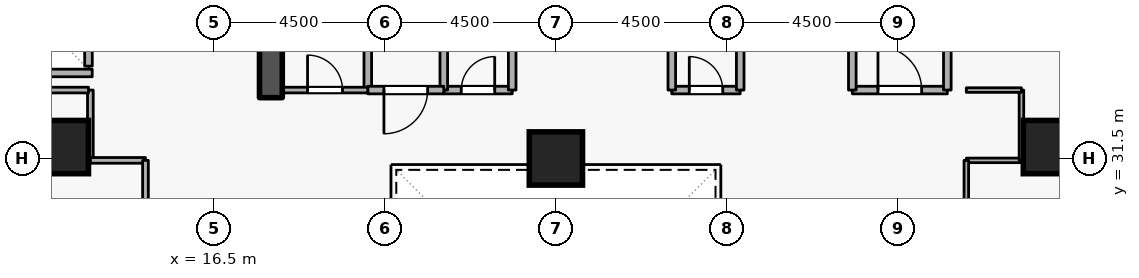
"""IFC4 building model, lengths in metres.
Left out: names, types, materials, properties, quantities, classifications, styles, units other than length and angle.
Written with IfcOpenShell. Run it as: python <this file> out.ifc"""

import sys

from ifc_helpers import new_model, si_unit, direction, frame, frame_2d, origin, origin_2d, place, context, subcontext, project, spatial, rectangle, extrude, element, fill, save


model = new_model("IFC4")
c1 = context("Model", 3, precision=1e-05, world=origin(), true_north=direction((0.0, 1.0)))
c2 = subcontext(c1, "Body", "Model", "MODEL_VIEW")
j1 = project(units=[si_unit("LENGTHUNIT", "METRE"), si_unit("PLANEANGLEUNIT", "RADIAN")], contexts=[c1])
p1 = place(None, origin())
s1 = spatial("IfcSite", under=j1, at=p1, CompositionType="ELEMENT")
p2 = place(p1, origin())
s2 = spatial("IfcBuilding", under=s1, at=p2, CompositionType="ELEMENT")
p3 = place(p2, frame((0.0, 0.0, 53.7)))
s3 = spatial("IfcBuildingStorey", under=s2, at=p3, CompositionType="ELEMENT", Elevation=53.7)
p4 = place(p3, frame((18.0, 33.1, 0.0), z_axis=(0.0, 0.0, 1.0), x_axis=(0.0, 1.0, 0.0)))
e1 = element("IfcWall", 1, at=p4, inside=s3, PredefinedType="SHEAR", context=c2, shape_type="SweptSolid", body=[
    extrude(rectangle(XDim=5.7, YDim=0.6, at=frame_2d((2.85, 0.0))), origin(), (0.0, 0.0, 1.0), 3.6),
])
for number, where, z_axis, x_axis in (
    (2, (12.5, 31.8, 0.0), (0.0, 0.0, 1.0), (1.0, 0.0, 0.0)),
    (3, (38.5, 31.8, 0.0), (0.0, 0.0, 1.0), (1.0, 0.0, 0.0)),
    (4, (25.5, 31.5, 0.0), (0.0, 0.0, 1.0), (1.0, 0.0, 0.0)),
):
    element("IfcColumn", number, at=place(p3, frame(where, z_axis=z_axis, x_axis=x_axis)), inside=s3, PredefinedType="COLUMN", context=c2, shape_type="SweptSolid", body=[
        extrude(rectangle(XDim=1.4, YDim=1.4, at=origin_2d()), origin(), (0.0, 0.0, 1.0), 3.6),
    ])
p5 = place(p3, frame((13.2, 33.93, 0.0), z_axis=(0.0, 0.0, 1.0), x_axis=(0.0, 1.0, 0.0)))
e5 = element("IfcWall", 5, at=p5, inside=s3, PredefinedType="STANDARD", context=c2, shape_type="SweptSolid", body=[
    extrude(rectangle(XDim=1.94, YDim=0.2, at=frame_2d((0.97, 0.0))), origin(), (0.0, 0.0, 1.0), 3.34),
])
p6 = place(p3, frame((11.002, 33.75, 0.0), z_axis=(0.0, 0.0, 1.0), x_axis=(1.0, 0.0, 0.0)))
e6 = element("IfcWall", 6, at=p6, inside=s3, PredefinedType="STANDARD", context=c2, shape_type="SweptSolid", body=[
    extrude(rectangle(XDim=2.296, YDim=0.2, at=frame_2d((1.148, 0.0))), origin(), (0.0, 0.0, 1.0), 3.34),
])
p7 = place(p3, frame((33.3, 33.3, 0.0), z_axis=(0.0, 0.0, 1.0), x_axis=(1.0, 0.0, 0.0)))
e7 = element("IfcWall", 7, at=p7, inside=s3, PredefinedType="STANDARD", context=c2, shape_type="SweptSolid", body=[
    extrude(rectangle(XDim=2.5, YDim=0.2, at=frame_2d((1.25, 0.0))), origin(), (0.0, 0.0, 1.0), 3.34),
])
p8 = place(p7, frame((0.675, 0.0, 0.0)))
e8 = element("IfcOpeningElement", 8, at=p8, cuts=e7, PredefinedType="OPENING", context=c2, shape_type="SweptSolid", body=[
    extrude(rectangle(XDim=1.15, YDim=2.1, at=frame_2d((0.575, 1.05))), frame((0.0, 0.11, 0.0), z_axis=(0.0, -1.0, 0.0), x_axis=(1.0, 0.0, 0.0)), (0.0, 0.0, 1.0), 0.22),
])
p9 = place(p3, frame((35.8, 33.3, 0.0), z_axis=(0.0, 0.0, 1.0), x_axis=(0.0, 1.0, 0.0)))
e9 = element("IfcWall", 9, at=p9, inside=s3, PredefinedType="STANDARD", context=c2, shape_type="SweptSolid", body=[
    extrude(rectangle(XDim=5.7, YDim=0.2, at=frame_2d((2.85, 0.0))), origin(), (0.0, 0.0, 1.0), 3.34),
])
p10 = place(p3, frame((33.3, 35.6, 0.0), z_axis=(0.0, 0.0, 1.0), x_axis=(0.0, -1.0, 0.0)))
e10 = element("IfcWall", 10, at=p10, inside=s3, PredefinedType="STANDARD", context=c2, shape_type="SweptSolid", body=[
    extrude(rectangle(XDim=2.3, YDim=0.2, at=frame_2d((1.15, 0.0))), origin(), (0.0, 0.0, 1.0), 2.545),
])
p11 = place(p3, frame((22.55, 33.3, 0.0), z_axis=(0.0, 0.0, 1.0), x_axis=(1.0, 0.0, 0.0)))
e11 = element("IfcWall", 11, at=p11, inside=s3, PredefinedType="STANDARD", context=c2, shape_type="SweptSolid", body=[
    extrude(rectangle(XDim=1.8, YDim=0.2, at=frame_2d((0.9, 0.0))), origin(), (0.0, 0.0, 1.0), 3.34),
])
p12 = place(p11, frame((0.46, 0.0, 0.0)))
e12 = element("IfcOpeningElement", 12, at=p12, cuts=e11, PredefinedType="OPENING", context=c2, shape_type="SweptSolid", body=[
    extrude(rectangle(XDim=0.88, YDim=2.04, at=frame_2d((0.44, 1.02))), frame((0.0, 0.11, 0.0), z_axis=(0.0, -1.0, 0.0), x_axis=(1.0, 0.0, 0.0)), (0.0, 0.0, 1.0), 0.22),
])
for number, where, z_axis, x_axis in (
    (13, (24.35, 33.3, 0.0), (0.0, 0.0, 1.0), (0.0, 1.0, 0.0)),
    (14, (22.55, 35.35, 0.0), (0.0, 0.0, 1.0), (0.0, -1.0, 0.0)),
):
    element("IfcWall", number, at=place(p3, frame(where, z_axis=z_axis, x_axis=x_axis)), inside=s3, PredefinedType="STANDARD", context=c2, shape_type="SweptSolid", body=[
        extrude(rectangle(XDim=2.05, YDim=0.2, at=frame_2d((1.025, 0.0))), origin(), (0.0, 0.0, 1.0), 3.34),
    ])
p13 = place(p3, frame((28.55, 33.3, 0.0), z_axis=(0.0, 0.0, 1.0), x_axis=(1.0, 0.0, 0.0)))
e15 = element("IfcWall", 15, at=p13, inside=s3, PredefinedType="STANDARD", context=c2, shape_type="SweptSolid", body=[
    extrude(rectangle(XDim=1.8, YDim=0.2, at=frame_2d((0.9, 0.0))), origin(), (0.0, 0.0, 1.0), 3.34),
])
p14 = place(p13, frame((0.46, 0.0, 0.0)))
e16 = element("IfcOpeningElement", 16, at=p14, cuts=e15, PredefinedType="OPENING", context=c2, shape_type="SweptSolid", body=[
    extrude(rectangle(XDim=0.88, YDim=2.04, at=frame_2d((0.44, 1.02))), frame((0.0, 0.11, 0.0), z_axis=(0.0, -1.0, 0.0), x_axis=(1.0, 0.0, 0.0)), (0.0, 0.0, 1.0), 0.22),
])
for number, where, z_axis, x_axis in (
    (17, (30.35, 33.3, 0.0), (0.0, 0.0, 1.0), (0.0, 1.0, 0.0)),
    (18, (28.55, 35.35, 0.0), (0.0, 0.0, 1.0), (0.0, -1.0, 0.0)),
    (19, (20.55, 33.3, 0.0), (0.0, 0.0, 1.0), (0.0, 1.0, 0.0)),
):
    element("IfcWall", number, at=place(p3, frame(where, z_axis=z_axis, x_axis=x_axis)), inside=s3, PredefinedType="STANDARD", context=c2, shape_type="SweptSolid", body=[
        extrude(rectangle(XDim=2.05, YDim=0.2, at=frame_2d((1.025, 0.0))), origin(), (0.0, 0.0, 1.0), 3.34),
    ])
p15 = place(p3, frame((22.55, 33.3, 0.0), z_axis=(0.0, 0.0, 1.0), x_axis=(-1.0, 0.0, 0.0)))
e20 = element("IfcWall", 20, at=p15, inside=s3, PredefinedType="STANDARD", context=c2, shape_type="SweptSolid", body=[
    extrude(rectangle(XDim=2.0, YDim=0.2, at=frame_2d((1.0, 0.0))), origin(), (0.0, 0.0, 1.0), 3.34),
])
p16 = place(p15, frame((0.425, 0.0, 0.0)))
e21 = element("IfcOpeningElement", 21, at=p16, cuts=e20, PredefinedType="OPENING", context=c2, shape_type="SweptSolid", body=[
    extrude(rectangle(XDim=1.15, YDim=2.1, at=frame_2d((0.575, 1.05))), frame((0.0, 0.11, 0.0), z_axis=(0.0, -1.0, 0.0), x_axis=(1.0, 0.0, 0.0)), (0.0, 0.0, 1.0), 0.22),
])
p17 = place(p3, frame((18.3, 33.3, 0.0), z_axis=(0.0, 0.0, 1.0), x_axis=(1.0, 0.0, 0.0)))
e22 = element("IfcWall", 22, at=p17, inside=s3, PredefinedType="PARTITIONING", context=c2, shape_type="SweptSolid", body=[
    extrude(rectangle(XDim=2.25, YDim=0.15, at=frame_2d((1.125, 0.0))), origin(), (0.0, 0.0, 1.0), 3.34),
])
p18 = place(p17, frame((0.665, 0.0, 0.0)))
e23 = element("IfcOpeningElement", 23, at=p18, cuts=e22, PredefinedType="OPENING", context=c2, shape_type="SweptSolid", body=[
    extrude(rectangle(XDim=0.92, YDim=2.08, at=frame_2d((0.46, 1.04))), frame((0.0, 0.085, 0.0), z_axis=(0.0, -1.0, 0.0), x_axis=(1.0, 0.0, 0.0)), (0.0, 0.0, 1.0), 0.17),
])
p19 = place(p3, frame((13.25, 33.3, 0.0), z_axis=(0.0, 0.0, 1.0), x_axis=(0.0, -1.0, 0.0)))
e24 = element("IfcWall", 24, at=p19, inside=s3, PredefinedType="PARTITIONING", context=c2, shape_type="SweptSolid", body=[
    extrude(rectangle(XDim=1.85, YDim=0.15, at=frame_2d((0.925, 0.0))), origin(), (0.0, 0.0, 1.0), 3.34),
])
p20 = place(p3, frame((13.25, 31.45, 0.0), z_axis=(0.0, 0.0, 1.0), x_axis=(1.0, 0.0, 0.0)))
e25 = element("IfcWall", 25, at=p20, inside=s3, PredefinedType="PARTITIONING", context=c2, shape_type="SweptSolid", body=[
    extrude(rectangle(XDim=1.45, YDim=0.15, at=frame_2d((0.725, 0.0))), origin(), (0.0, 0.0, 1.0), 3.34),
])
p21 = place(p3, frame((14.7, 31.45, 0.0), z_axis=(0.0, 0.0, 1.0), x_axis=(0.0, -1.0, 0.0)))
e26 = element("IfcWall", 26, at=p21, inside=s3, PredefinedType="PARTITIONING", context=c2, shape_type="SweptSolid", body=[
    extrude(rectangle(XDim=4.45, YDim=0.15, at=frame_2d((2.225, 0.0))), origin(), (0.0, 0.0, 1.0), 3.34),
])
p22 = place(p21, frame((1.575, 0.0, 0.0)))
e27 = element("IfcOpeningElement", 27, at=p22, cuts=e26, PredefinedType="OPENING", context=c2, shape_type="SweptSolid", body=[
    extrude(rectangle(XDim=1.3, YDim=2.12, at=frame_2d((0.65, 1.06))), frame((0.0, 0.085, 0.0), z_axis=(0.0, -1.0, 0.0), x_axis=(1.0, 0.0, 0.0)), (0.0, 0.0, 1.0), 0.17),
])
p23 = place(p3, frame((10.9, 33.3, 0.0), z_axis=(0.0, 0.0, 1.0), x_axis=(1.0, 0.0, 0.0)))
e28 = element("IfcWall", 28, at=p23, inside=s3, PredefinedType="PARTITIONING", context=c2, shape_type="SweptSolid", body=[
    extrude(rectangle(XDim=2.3, YDim=0.15, at=frame_2d((1.15, 0.0))), origin(), (0.0, 0.0, 1.0), 3.34),
])
p24 = place(p3, frame((36.3, 31.45, 0.0), z_axis=(0.0, 0.0, 1.0), x_axis=(1.0, 0.0, 0.0)))
e29 = element("IfcWall", 29, at=p24, inside=s3, PredefinedType="PARTITIONING", context=c2, shape_type="SweptSolid", body=[
    extrude(rectangle(XDim=1.45, YDim=0.12, at=frame_2d((0.725, 0.0))), origin(), (0.0, 0.0, 1.0), 3.34),
])
p25 = place(p3, frame((37.75, 31.45, 0.0), z_axis=(0.0, 0.0, 1.0), x_axis=(0.0, 1.0, 0.0)))
e30 = element("IfcWall", 30, at=p25, inside=s3, PredefinedType="PARTITIONING", context=c2, shape_type="SweptSolid", body=[
    extrude(rectangle(XDim=1.85, YDim=0.12, at=frame_2d((0.925, 0.0))), origin(), (0.0, 0.0, 1.0), 3.34),
])
p26 = place(p3, frame((37.75, 33.3, 0.0), z_axis=(0.0, 0.0, 1.0), x_axis=(-1.0, 0.0, 0.0)))
e31 = element("IfcWall", 31, at=p26, inside=s3, PredefinedType="PARTITIONING", context=c2, shape_type="SweptSolid", body=[
    extrude(rectangle(XDim=1.45, YDim=0.12, at=frame_2d((0.725, 0.0))), origin(), (0.0, 0.0, 1.0), 3.34),
])
p27 = place(p3, frame((36.3, 27.0, 0.0), z_axis=(0.0, 0.0, 1.0), x_axis=(0.0, 1.0, 0.0)))
e32 = element("IfcWall", 32, at=p27, inside=s3, PredefinedType="PARTITIONING", context=c2, shape_type="SweptSolid", body=[
    extrude(rectangle(XDim=4.45, YDim=0.12, at=frame_2d((2.225, 0.0))), origin(), (0.0, 0.0, 1.0), 3.34),
])
p28 = place(p27, frame((1.7, 0.0, 0.0)))
e33 = element("IfcOpeningElement", 33, at=p28, cuts=e32, PredefinedType="OPENING", context=c2, shape_type="SweptSolid", body=[
    extrude(rectangle(XDim=1.05, YDim=2.1, at=frame_2d((0.525, 1.05))), frame((0.0, 0.07, 0.0), z_axis=(0.0, -1.0, 0.0), x_axis=(1.0, 0.0, 0.0)), (0.0, 0.0, 1.0), 0.14),
])
p29 = place(p8, origin())
e34 = element("IfcDoor", 34, at=p29, inside=s3, OperationType="SINGLE_SWING_LEFT", PredefinedType="DOOR", context=c2, shape_type="SweptSolid", body=[
    extrude(rectangle(XDim=1.15, YDim=2.1, at=frame_2d((0.575, 1.05))), frame((0.0, 0.025, 0.0), z_axis=(0.0, -1.0, 0.0), x_axis=(1.0, 0.0, 0.0)), (0.0, 0.0, 1.0), 0.05),
])
fill(e8, e34)
p30 = place(p12, origin())
e35 = element("IfcDoor", 35, at=p30, inside=s3, OperationType="SINGLE_SWING_RIGHT", PredefinedType="DOOR", context=c2, shape_type="SweptSolid", body=[
    extrude(rectangle(XDim=0.88, YDim=2.04, at=frame_2d((0.44, 1.02))), frame((0.0, 0.025, 0.0), z_axis=(0.0, -1.0, 0.0), x_axis=(1.0, 0.0, 0.0)), (0.0, 0.0, 1.0), 0.05),
])
fill(e12, e35)
p31 = place(p14, origin())
e36 = element("IfcDoor", 36, at=p31, inside=s3, OperationType="SINGLE_SWING_LEFT", PredefinedType="DOOR", context=c2, shape_type="SweptSolid", body=[
    extrude(rectangle(XDim=0.88, YDim=2.04, at=frame_2d((0.44, 1.02))), frame((0.0, 0.025, 0.0), z_axis=(0.0, -1.0, 0.0), x_axis=(1.0, 0.0, 0.0)), (0.0, 0.0, 1.0), 0.05),
])
fill(e16, e36)
p32 = place(p18, origin())
e37 = element("IfcDoor", 37, at=p32, inside=s3, OperationType="SINGLE_SWING_LEFT", PredefinedType="DOOR", context=c2, shape_type="SweptSolid", body=[
    extrude(rectangle(XDim=0.92, YDim=2.08, at=frame_2d((0.46, 1.04))), frame((0.0, 0.025, 0.0), z_axis=(0.0, -1.0, 0.0), x_axis=(1.0, 0.0, 0.0)), (0.0, 0.0, 1.0), 0.05),
])
fill(e23, e37)
p33 = place(p16, origin())
e38 = element("IfcDoor", 38, at=p33, inside=s3, OperationType="SINGLE_SWING_RIGHT", PredefinedType="DOOR", context=c2, shape_type="SweptSolid", body=[
    extrude(rectangle(XDim=1.15, YDim=2.1, at=frame_2d((0.575, 1.05))), frame((0.0, 0.025, 0.0), z_axis=(0.0, -1.0, 0.0), x_axis=(1.0, 0.0, 0.0)), (0.0, 0.0, 1.0), 0.05),
])
fill(e21, e38)
save(model, sys.argv[1])
